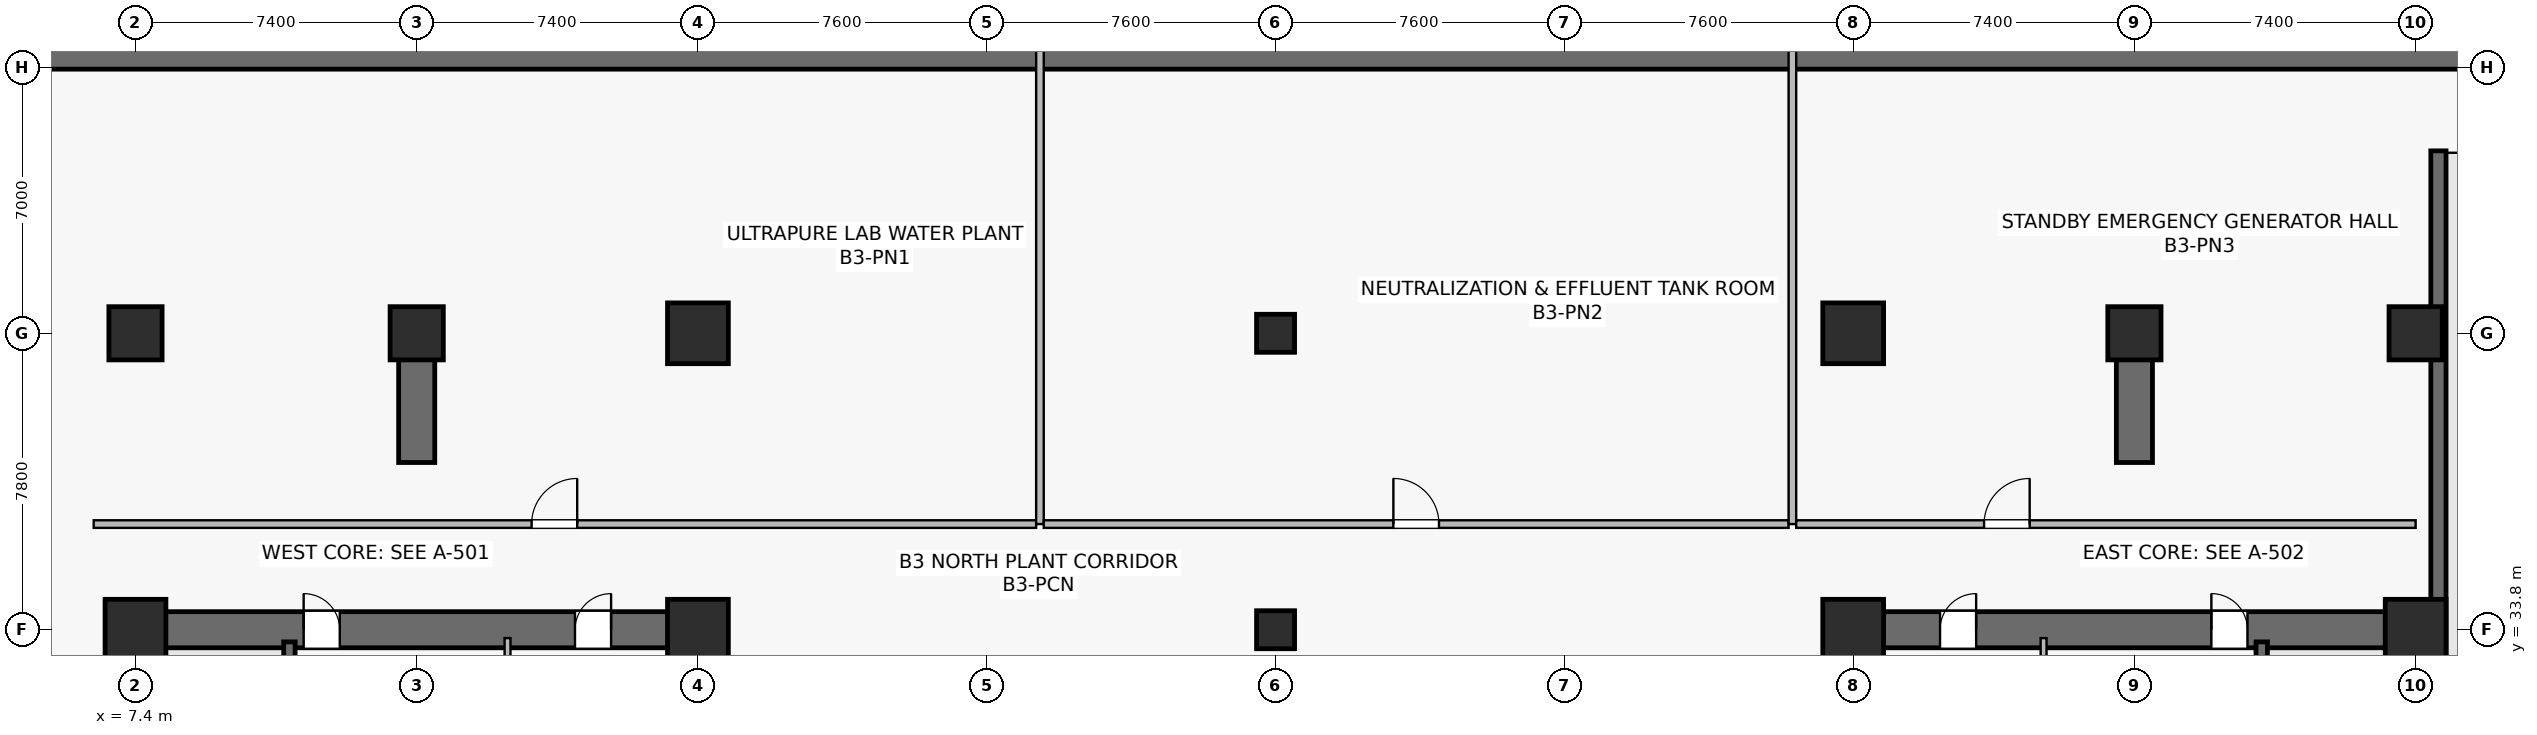
"""IFC4 building model, lengths in metres.
Left out: names, types, materials, properties, quantities, classifications, styles, units other than length and angle.
Written with IfcOpenShell. Run it as: python <this file> out.ifc"""

import sys

from ifc_helpers import new_model, si_unit, direction, frame, frame_2d, origin, origin_2d, place, context, subcontext, project, spatial, rectangle, extrude, source, transform, mapped, element, fill, save


model = new_model("IFC4")
c1 = context("Model", 3, precision=1e-05, world=origin(), true_north=direction((0.0, 1.0)))
c2 = subcontext(c1, "Body", "Model", "MODEL_VIEW")
j1 = project(units=[si_unit("LENGTHUNIT", "METRE"), si_unit("PLANEANGLEUNIT", "RADIAN")], contexts=[c1])
p1 = place(None, origin())
s1 = spatial("IfcSite", under=j1, at=p1, CompositionType="ELEMENT")
p2 = place(p1, origin())
s2 = spatial("IfcBuilding", under=s1, at=p2, CompositionType="ELEMENT")
p3 = place(p2, frame((0.0, 0.0, -14.4)))
s3 = spatial("IfcBuildingStorey", under=s2, at=p3, CompositionType="ELEMENT", Elevation=-14.4)
p4 = place(p3, frame((6.925, 33.8, 0.0), z_axis=(0.0, 0.0, 1.0), x_axis=(1.0, 0.0, 0.0)))
e1 = element("IfcWall", 1, at=p4, inside=s3, PredefinedType="SHEAR", context=c2, shape_type="SweptSolid", body=[
    extrude(rectangle(XDim=15.75, YDim=0.95, at=frame_2d((7.875, 0.0))), origin(), (0.0, 0.0, 1.0), 4.42),
])
p5 = place(p4, frame((4.9, 0.0, 0.0)))
e2 = element("IfcOpeningElement", 2, at=p5, cuts=e1, PredefinedType="OPENING", context=c2, shape_type="SweptSolid", body=[
    extrude(rectangle(XDim=0.95, YDim=2.15, at=frame_2d((0.475, 1.075))), frame((0.0, 0.485, 0.0), z_axis=(0.0, -1.0, 0.0), x_axis=(1.0, 0.0, 0.0)), (0.0, 0.0, 1.0), 0.97),
])
p6 = place(p4, frame((12.04, 0.0, 0.0)))
e3 = element("IfcOpeningElement", 3, at=p6, cuts=e1, PredefinedType="OPENING", context=c2, shape_type="SweptSolid", body=[
    extrude(rectangle(XDim=0.95, YDim=2.15, at=frame_2d((0.475, 1.075))), frame((0.0, 0.485, 0.0), z_axis=(0.0, -1.0, 0.0), x_axis=(1.0, 0.0, 0.0)), (0.0, 0.0, 1.0), 0.97),
])
p7 = place(p3, frame((7.4, 15.275, 0.0), z_axis=(0.0, 0.0, 1.0), x_axis=(0.0, 1.0, 0.0)))
e4 = element("IfcWall", 4, at=p7, inside=s3, PredefinedType="SHEAR", context=c2, shape_type="SweptSolid", body=[
    extrude(rectangle(XDim=18.05, YDim=0.95, at=frame_2d((9.025, 0.0))), origin(), (0.0, 0.0, 1.0), 4.42),
])
p8 = place(p3, frame((22.2, 15.275, 0.0), z_axis=(0.0, 0.0, 1.0), x_axis=(0.0, 1.0, 0.0)))
e5 = element("IfcWall", 5, at=p8, inside=s3, PredefinedType="SHEAR", context=c2, shape_type="SweptSolid", body=[
    extrude(rectangle(XDim=18.05, YDim=0.95, at=frame_2d((9.025, 0.0))), origin(), (0.0, 0.0, 1.0), 4.42),
])
p9 = place(p8, frame((3.275, 0.0, 0.0)))
e6 = element("IfcOpeningElement", 6, at=p9, cuts=e5, PredefinedType="OPENING", context=c2, shape_type="SweptSolid", body=[
    extrude(rectangle(XDim=1.42, YDim=2.2, at=frame_2d((0.71, 1.1))), frame((0.0, 0.485, 0.0), z_axis=(0.0, -1.0, 0.0), x_axis=(1.0, 0.0, 0.0)), (0.0, 0.0, 1.0), 0.97),
])
p10 = place(p3, frame((11.45, 24.85, 0.0), z_axis=(0.0, 0.0, 1.0), x_axis=(0.0, 1.0, 0.0)))
e7 = element("IfcWall", 7, at=p10, inside=s3, PredefinedType="SHEAR", context=c2, shape_type="SweptSolid", body=[
    extrude(rectangle(XDim=8.63, YDim=0.3, at=frame_2d((4.315, 0.0))), origin(), (0.0, 0.0, 1.0), 4.42),
])
p11 = place(p10, frame((0.42, 0.0, 0.0)))
e8 = element("IfcOpeningElement", 8, at=p11, cuts=e7, PredefinedType="OPENING", context=c2, shape_type="SweptSolid", body=[
    extrude(rectangle(XDim=1.1, YDim=2.15, at=frame_2d((0.55, 1.075))), frame((0.0, 0.16, 0.0), z_axis=(0.0, -1.0, 0.0), x_axis=(1.0, 0.0, 0.0)), (0.0, 0.0, 1.0), 0.32),
])
p12 = place(p3, frame((52.125, 33.8, 0.0), z_axis=(0.0, 0.0, 1.0), x_axis=(1.0, 0.0, 0.0)))
e9 = element("IfcWall", 9, at=p12, inside=s3, PredefinedType="SHEAR", context=c2, shape_type="SweptSolid", body=[
    extrude(rectangle(XDim=15.75, YDim=0.95, at=frame_2d((7.875, 0.0))), origin(), (0.0, 0.0, 1.0), 4.42),
])
p13 = place(p12, frame((9.9, 0.0, 0.0)))
e10 = element("IfcOpeningElement", 10, at=p13, cuts=e9, PredefinedType="OPENING", context=c2, shape_type="SweptSolid", body=[
    extrude(rectangle(XDim=0.95, YDim=2.15, at=frame_2d((0.475, 1.075))), frame((0.0, 0.485, 0.0), z_axis=(0.0, -1.0, 0.0), x_axis=(1.0, 0.0, 0.0)), (0.0, 0.0, 1.0), 0.97),
])
p14 = place(p12, frame((2.76, 0.0, 0.0)))
e11 = element("IfcOpeningElement", 11, at=p14, cuts=e9, PredefinedType="OPENING", context=c2, shape_type="SweptSolid", body=[
    extrude(rectangle(XDim=0.95, YDim=2.15, at=frame_2d((0.475, 1.075))), frame((0.0, 0.485, 0.0), z_axis=(0.0, -1.0, 0.0), x_axis=(1.0, 0.0, 0.0)), (0.0, 0.0, 1.0), 0.97),
])
p15 = place(p3, frame((52.6, 15.275, 0.0), z_axis=(0.0, 0.0, 1.0), x_axis=(0.0, 1.0, 0.0)))
e12 = element("IfcWall", 12, at=p15, inside=s3, PredefinedType="SHEAR", context=c2, shape_type="SweptSolid", body=[
    extrude(rectangle(XDim=18.05, YDim=0.95, at=frame_2d((9.025, 0.0))), origin(), (0.0, 0.0, 1.0), 4.42),
])
p16 = place(p15, frame((3.275, 0.0, 0.0)))
e13 = element("IfcOpeningElement", 13, at=p16, cuts=e12, PredefinedType="OPENING", context=c2, shape_type="SweptSolid", body=[
    extrude(rectangle(XDim=1.42, YDim=2.2, at=frame_2d((0.71, 1.1))), frame((0.0, 0.485, 0.0), z_axis=(0.0, -1.0, 0.0), x_axis=(1.0, 0.0, 0.0)), (0.0, 0.0, 1.0), 0.97),
])
p17 = place(p3, frame((67.4, 15.275, 0.0), z_axis=(0.0, 0.0, 1.0), x_axis=(0.0, 1.0, 0.0)))
e14 = element("IfcWall", 14, at=p17, inside=s3, PredefinedType="SHEAR", context=c2, shape_type="SweptSolid", body=[
    extrude(rectangle(XDim=18.05, YDim=0.95, at=frame_2d((9.025, 0.0))), origin(), (0.0, 0.0, 1.0), 4.42),
])
p18 = place(p3, frame((63.35, 24.85, 0.0), z_axis=(0.0, 0.0, 1.0), x_axis=(0.0, 1.0, 0.0)))
e15 = element("IfcWall", 15, at=p18, inside=s3, PredefinedType="SHEAR", context=c2, shape_type="SweptSolid", body=[
    extrude(rectangle(XDim=8.63, YDim=0.3, at=frame_2d((4.315, 0.0))), origin(), (0.0, 0.0, 1.0), 4.42),
])
p19 = place(p18, frame((0.42, 0.0, 0.0)))
e16 = element("IfcOpeningElement", 16, at=p19, cuts=e15, PredefinedType="OPENING", context=c2, shape_type="SweptSolid", body=[
    extrude(rectangle(XDim=1.1, YDim=2.15, at=frame_2d((0.55, 1.075))), frame((0.0, 0.16, 0.0), z_axis=(0.0, -1.0, 0.0), x_axis=(1.0, 0.0, 0.0)), (0.0, 0.0, 1.0), 0.32),
])
for number, where, z_axis, x_axis in (
    (17, (14.8, 38.2, 0.0), (0.0, 0.0, 1.0), (0.0, 1.0, 0.0)),
    (18, (60.0, 38.2, 0.0), (0.0, 0.0, 1.0), (0.0, 1.0, 0.0)),
):
    element("IfcWall", number, at=place(p3, frame(where, z_axis=z_axis, x_axis=x_axis)), inside=s3, PredefinedType="SHEAR", context=c2, shape_type="SweptSolid", body=[
        extrude(rectangle(XDim=3.1, YDim=0.95, at=frame_2d((1.55, 0.0))), origin(), (0.0, 0.0, 1.0), 4.42),
    ])
p20 = place(p3, frame((-1.0, 48.975, 0.0), z_axis=(0.0, 0.0, 1.0), x_axis=(1.0, 0.0, 0.0)))
e19 = element("IfcWall", 19, at=p20, inside=s3, PredefinedType="SOLIDWALL", context=c2, shape_type="SweptSolid", body=[
    extrude(rectangle(XDim=76.8, YDim=0.85, at=frame_2d((38.4, 0.0))), origin(), (0.0, 0.0, 1.0), 4.42),
])
p21 = place(p3, frame((68.0, 6.0, 0.0), z_axis=(0.0, 0.0, 1.0), x_axis=(0.0, 1.0, 0.0)))
e20 = element("IfcWall", 20, at=p21, inside=s3, PredefinedType="SHEAR", context=c2, shape_type="SweptSolid", body=[
    extrude(rectangle(XDim=40.4, YDim=0.4, at=frame_2d((20.2, 0.0))), origin(), (0.0, 0.0, 1.0), 4.42),
])
m1 = source(origin(), c2, "Body", "SweptSolid", [
    extrude(rectangle(XDim=1.6, YDim=1.6, at=origin_2d()), origin(), (0.0, 0.0, 1.0), 4.8),
])
for number, where, z_axis, x_axis in (
    (21, (7.4, 33.8, 0.0), (0.0, 0.0, 1.0), (1.0, 0.0, 0.0)),
    (22, (22.2, 33.8, 0.0), (0.0, 0.0, 1.0), (1.0, 0.0, 0.0)),
):
    element("IfcColumn", number, at=place(p3, frame(where, z_axis=z_axis, x_axis=x_axis)), inside=s3, PredefinedType="COLUMN", context=c2, shape_type="MappedRepresentation", body=[
        mapped(m1, transform((0.0, 0.0, 0.0), scale=1.0)),
    ])
m2 = source(origin(), c2, "Body", "SweptSolid", [
    extrude(rectangle(XDim=1.4, YDim=1.4, at=origin_2d()), origin(), (0.0, 0.0, 1.0), 4.8),
])
p22 = place(p3, frame((14.8, 41.6, 0.0), z_axis=(0.0, 0.0, 1.0), x_axis=(1.0, 0.0, 0.0)))
e23 = element("IfcColumn", 23, at=p22, inside=s3, PredefinedType="COLUMN", context=c2, shape_type="MappedRepresentation", body=[
    mapped(m2, transform((0.0, 0.0, 0.0), scale=1.0)),
])
for number, where, z_axis, x_axis in (
    (24, (22.2, 41.6, 0.0), (0.0, 0.0, 1.0), (1.0, 0.0, 0.0)),
    (25, (52.6, 33.8, 0.0), (0.0, 0.0, 1.0), (1.0, 0.0, 0.0)),
    (26, (67.4, 33.8, 0.0), (0.0, 0.0, 1.0), (1.0, 0.0, 0.0)),
    (27, (52.6, 41.6, 0.0), (0.0, 0.0, 1.0), (1.0, 0.0, 0.0)),
):
    element("IfcColumn", number, at=place(p3, frame(where, z_axis=z_axis, x_axis=x_axis)), inside=s3, PredefinedType="COLUMN", context=c2, shape_type="MappedRepresentation", body=[
        mapped(m1, transform((0.0, 0.0, 0.0), scale=1.0)),
    ])
for number, where, z_axis, x_axis in (
    (28, (60.0, 41.6, 0.0), (0.0, 0.0, 1.0), (1.0, 0.0, 0.0)),
    (29, (7.4, 41.6, 0.0), (0.0, 0.0, 1.0), (1.0, 0.0, 0.0)),
    (30, (67.4, 41.6, 0.0), (0.0, 0.0, 1.0), (1.0, 0.0, 0.0)),
):
    element("IfcColumn", number, at=place(p3, frame(where, z_axis=z_axis, x_axis=x_axis)), inside=s3, PredefinedType="COLUMN", context=c2, shape_type="MappedRepresentation", body=[
        mapped(m2, transform((0.0, 0.0, 0.0), scale=1.0)),
    ])
m3 = source(origin(), c2, "Body", "SweptSolid", [
    extrude(rectangle(XDim=1.0, YDim=1.0, at=origin_2d()), origin(), (0.0, 0.0, 1.0), 4.8),
])
for number, where, z_axis, x_axis in (
    (31, (37.4, 33.8, 0.0), (0.0, 0.0, 1.0), (1.0, 0.0, 0.0)),
    (32, (37.4, 41.6, 0.0), (0.0, 0.0, 1.0), (1.0, 0.0, 0.0)),
):
    element("IfcColumn", number, at=place(p3, frame(where, z_axis=z_axis, x_axis=x_axis)), inside=s3, PredefinedType="COLUMN", context=c2, shape_type="MappedRepresentation", body=[
        mapped(m3, transform((0.0, 0.0, 0.0), scale=1.0)),
    ])
for number, where, z_axis, x_axis in (
    (33, (17.19, 29.65, 0.0), (0.0, 0.0, 1.0), (0.0, 1.0, 0.0)),
    (34, (57.61, 29.65, 0.0), (0.0, 0.0, 1.0), (0.0, 1.0, 0.0)),
):
    element("IfcWall", number, at=place(p3, frame(where, z_axis=z_axis, x_axis=x_axis)), inside=s3, PredefinedType="PLUMBINGWALL", context=c2, shape_type="SweptSolid", body=[
        extrude(rectangle(XDim=3.93, YDim=0.155, at=frame_2d((1.965, 0.0))), origin(), (0.0, 0.0, 1.0), 4.42),
    ])
p23 = place(p3, frame((6.3, 36.58, 0.0), z_axis=(0.0, 0.0, 1.0), x_axis=(1.0, 0.0, 0.0)))
e35 = element("IfcWall", 35, at=p23, inside=s3, PredefinedType="SOLIDWALL", context=c2, shape_type="SweptSolid", body=[
    extrude(rectangle(XDim=24.8, YDim=0.2, at=frame_2d((12.4, 0.0))), origin(), (0.0, 0.0, 1.0), 3.655),
])
p24 = place(p23, frame((11.523, 0.0, 0.0)))
e36 = element("IfcOpeningElement", 36, at=p24, cuts=e35, PredefinedType="OPENING", context=c2, shape_type="SweptSolid", body=[
    extrude(rectangle(XDim=1.2, YDim=2.16, at=frame_2d((0.6, 1.08))), frame((0.0, 0.11, 0.0), z_axis=(0.0, -1.0, 0.0), x_axis=(1.0, 0.0, 0.0)), (0.0, 0.0, 1.0), 0.22),
])
p25 = place(p3, frame((31.2, 36.58, 0.0), z_axis=(0.0, 0.0, 1.0), x_axis=(0.0, 1.0, 0.0)))
e37 = element("IfcWall", 37, at=p25, inside=s3, PredefinedType="SOLIDWALL", context=c2, shape_type="SweptSolid", body=[
    extrude(rectangle(XDim=12.71, YDim=0.2, at=frame_2d((6.355, 0.0))), origin(), (0.0, 0.0, 1.0), 3.605),
])
p26 = place(p3, frame((31.3, 36.58, 0.0), z_axis=(0.0, 0.0, 1.0), x_axis=(1.0, 0.0, 0.0)))
e38 = element("IfcWall", 38, at=p26, inside=s3, PredefinedType="SOLIDWALL", context=c2, shape_type="SweptSolid", body=[
    extrude(rectangle(XDim=19.6, YDim=0.2, at=frame_2d((9.8, 0.0))), origin(), (0.0, 0.0, 1.0), 3.655),
])
p27 = place(p26, frame((9.2, 0.0, 0.0)))
e39 = element("IfcOpeningElement", 39, at=p27, cuts=e38, PredefinedType="OPENING", context=c2, shape_type="SweptSolid", body=[
    extrude(rectangle(XDim=1.2, YDim=2.16, at=frame_2d((0.6, 1.08))), frame((0.0, 0.11, 0.0), z_axis=(0.0, -1.0, 0.0), x_axis=(1.0, 0.0, 0.0)), (0.0, 0.0, 1.0), 0.22),
])
p28 = place(p3, frame((51.0, 36.58, 0.0), z_axis=(0.0, 0.0, 1.0), x_axis=(0.0, 1.0, 0.0)))
e40 = element("IfcWall", 40, at=p28, inside=s3, PredefinedType="SOLIDWALL", context=c2, shape_type="SweptSolid", body=[
    extrude(rectangle(XDim=12.71, YDim=0.2, at=frame_2d((6.355, 0.0))), origin(), (0.0, 0.0, 1.0), 3.605),
])
p29 = place(p3, frame((51.1, 36.58, 0.0), z_axis=(0.0, 0.0, 1.0), x_axis=(1.0, 0.0, 0.0)))
e41 = element("IfcWall", 41, at=p29, inside=s3, PredefinedType="SOLIDWALL", context=c2, shape_type="SweptSolid", body=[
    extrude(rectangle(XDim=16.3, YDim=0.2, at=frame_2d((8.15, 0.0))), origin(), (0.0, 0.0, 1.0), 3.655),
])
p30 = place(p29, frame((4.944, 0.0, 0.0)))
e42 = element("IfcOpeningElement", 42, at=p30, cuts=e41, PredefinedType="OPENING", context=c2, shape_type="SweptSolid", body=[
    extrude(rectangle(XDim=1.2, YDim=2.16, at=frame_2d((0.6, 1.08))), frame((0.0, 0.11, 0.0), z_axis=(0.0, -1.0, 0.0), x_axis=(1.0, 0.0, 0.0)), (0.0, 0.0, 1.0), 0.22),
])
m4 = source(origin(), c2, "Body", "SweptSolid", [
    extrude(rectangle(XDim=0.95, YDim=2.15, at=frame_2d((0.475, 1.075))), frame((0.0, 0.025, 0.0), z_axis=(0.0, -1.0, 0.0), x_axis=(1.0, 0.0, 0.0)), (0.0, 0.0, 1.0), 0.05),
])
p31 = place(p5, origin())
e43 = element("IfcDoor", 43, at=p31, inside=s3, OperationType="SINGLE_SWING_LEFT", PredefinedType="DOOR", context=c2, shape_type="MappedRepresentation", body=[
    mapped(m4, transform((0.0, 0.0, 0.0), scale=1.0)),
])
fill(e2, e43)
p32 = place(p6, origin())
e44 = element("IfcDoor", 44, at=p32, inside=s3, OperationType="SINGLE_SWING_RIGHT", PredefinedType="DOOR", context=c2, shape_type="MappedRepresentation", body=[
    mapped(m4, transform((0.0, 0.0, 0.0), scale=1.0)),
])
fill(e3, e44)
p33 = place(p13, origin())
e45 = element("IfcDoor", 45, at=p33, inside=s3, OperationType="SINGLE_SWING_LEFT", PredefinedType="DOOR", context=c2, shape_type="MappedRepresentation", body=[
    mapped(m4, transform((0.0, 0.0, 0.0), scale=1.0)),
])
fill(e10, e45)
p34 = place(p14, origin())
e46 = element("IfcDoor", 46, at=p34, inside=s3, OperationType="SINGLE_SWING_RIGHT", PredefinedType="DOOR", context=c2, shape_type="MappedRepresentation", body=[
    mapped(m4, transform((0.0, 0.0, 0.0), scale=1.0)),
])
fill(e11, e46)
m5 = source(origin(), c2, "Body", "SweptSolid", [
    extrude(rectangle(XDim=1.2, YDim=2.16, at=frame_2d((0.6, 1.08))), frame((0.0, 0.025, 0.0), z_axis=(0.0, -1.0, 0.0), x_axis=(1.0, 0.0, 0.0)), (0.0, 0.0, 1.0), 0.05),
])
p35 = place(p24, origin())
e47 = element("IfcDoor", 47, at=p35, inside=s3, OperationType="SINGLE_SWING_RIGHT", PredefinedType="DOOR", context=c2, shape_type="MappedRepresentation", body=[
    mapped(m5, transform((0.0, 0.0, 0.0), scale=1.0)),
])
fill(e36, e47)
p36 = place(p27, origin())
e48 = element("IfcDoor", 48, at=p36, inside=s3, OperationType="SINGLE_SWING_LEFT", PredefinedType="DOOR", context=c2, shape_type="MappedRepresentation", body=[
    mapped(m5, transform((0.0, 0.0, 0.0), scale=1.0)),
])
fill(e39, e48)
p37 = place(p30, origin())
e49 = element("IfcDoor", 49, at=p37, inside=s3, OperationType="SINGLE_SWING_RIGHT", PredefinedType="DOOR", context=c2, shape_type="MappedRepresentation", body=[
    mapped(m5, transform((0.0, 0.0, 0.0), scale=1.0)),
])
fill(e42, e49)
save(model, sys.argv[1])
